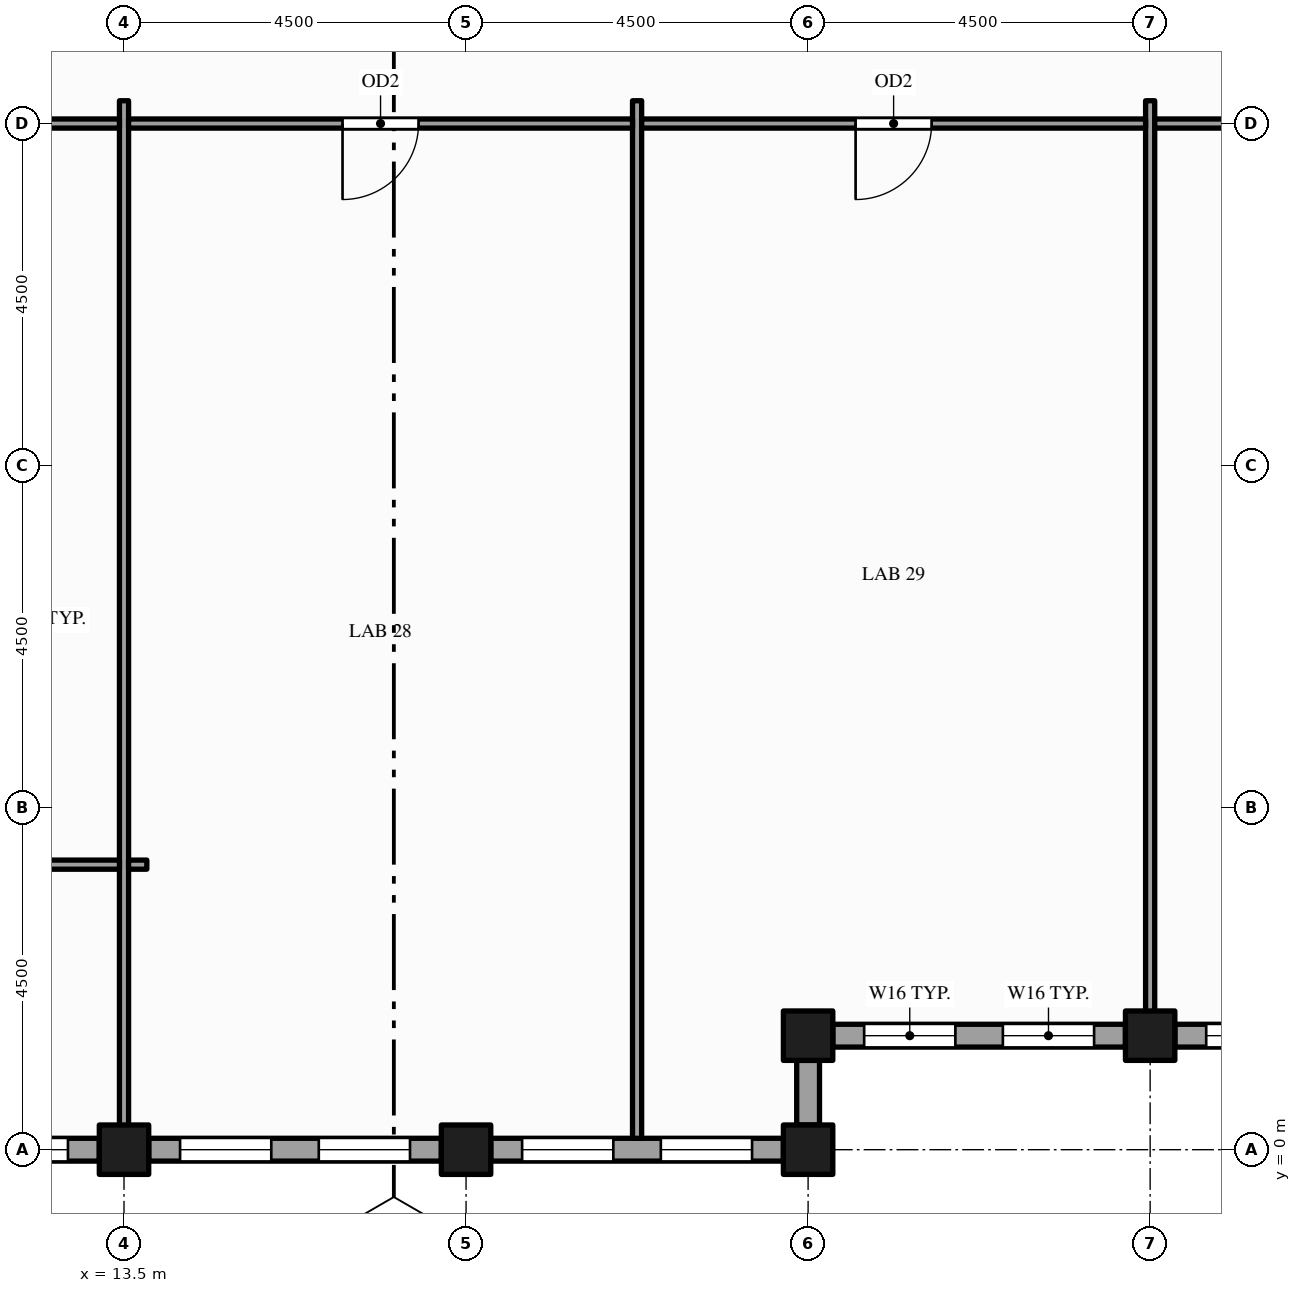
"""IFC4 building model, lengths in metres.
Left out: names, types, materials, properties, quantities, classifications, styles, units other than length and angle.
Written with IfcOpenShell. Run it as: python <this file> out.ifc"""

import sys

from ifc_helpers import new_model, si_unit, direction, frame, frame_2d, origin, origin_2d, place, context, subcontext, project, spatial, rectangle, hollow_rectangle, extrude, element, fill, save


model = new_model("IFC4")
c1 = context("Model", 3, precision=1e-05, world=origin(), true_north=direction((0.0, 1.0)))
c2 = subcontext(c1, "Body", "Model", "MODEL_VIEW")
j1 = project(units=[si_unit("LENGTHUNIT", "METRE"), si_unit("PLANEANGLEUNIT", "RADIAN")], contexts=[c1])
p1 = place(None, origin())
s1 = spatial("IfcSite", under=j1, at=p1, CompositionType="ELEMENT")
p2 = place(p1, origin())
s2 = spatial("IfcBuilding", under=s1, at=p2, CompositionType="ELEMENT")
p3 = place(p2, frame((0.0, 0.0, 285.0)))
s3 = spatial("IfcBuildingStorey", under=s2, at=p3, CompositionType="ELEMENT", Elevation=285.0)
for number, where, z_axis, x_axis in (
    (1, (13.5, 0.0, -0.15), (0.0, 0.0, 1.0), (1.0, 0.0, 0.0)),
    (2, (18.0, 0.0, -0.15), (0.0, 0.0, 1.0), (1.0, 0.0, 0.0)),
    (3, (22.5, 0.0, -0.15), (0.0, 0.0, 1.0), (1.0, 0.0, 0.0)),
    (4, (22.5, 1.5, -0.15), (0.0, 0.0, 1.0), (1.0, 0.0, 0.0)),
    (5, (27.0, 1.5, -0.15), (0.0, 0.0, 1.0), (1.0, 0.0, 0.0)),
):
    element("IfcColumn", number, at=place(p3, frame(where, z_axis=z_axis, x_axis=x_axis)), inside=s3, PredefinedType="COLUMN", context=c2, shape_type="SweptSolid", body=[
        extrude(hollow_rectangle(XDim=0.65, YDim=0.65, WallThickness=0.032, at=origin_2d()), origin(), (0.0, 0.0, 1.0), 4.0),
    ])
p4 = place(p3, frame((22.5, 0.325, 0.0), z_axis=(0.0, 0.0, 1.0), x_axis=(0.0, 1.0, 0.0)))
e6 = element("IfcWall", 6, at=p4, inside=s3, PredefinedType="STANDARD", context=c2, shape_type="SweptSolid", body=[
    extrude(rectangle(XDim=0.85, YDim=0.3, at=frame_2d((0.425, 0.0))), origin(), (0.0, 0.0, 1.0), 3.162),
])
p5 = place(p3, frame((22.825, 1.5, 0.0), z_axis=(0.0, 0.0, 1.0), x_axis=(1.0, 0.0, 0.0)))
e7 = element("IfcWall", 7, at=p5, inside=s3, PredefinedType="STANDARD", context=c2, shape_type="SweptSolid", body=[
    extrude(rectangle(XDim=3.85, YDim=0.3, at=frame_2d((1.925, 0.0))), origin(), (0.0, 0.0, 1.0), 2.87),
])
p6 = place(p5, frame((0.413, 0.0, 0.9)))
e8 = element("IfcOpeningElement", 8, at=p6, cuts=e7, PredefinedType="OPENING", context=c2, shape_type="SweptSolid", body=[
    extrude(rectangle(XDim=1.2, YDim=1.75, at=frame_2d((0.6, 0.875))), frame((0.0, 0.16, 0.0), z_axis=(0.0, -1.0, 0.0), x_axis=(1.0, 0.0, 0.0)), (0.0, 0.0, 1.0), 0.32),
])
p7 = place(p5, frame((2.238, 0.0, 0.9)))
e9 = element("IfcOpeningElement", 9, at=p7, cuts=e7, PredefinedType="OPENING", context=c2, shape_type="SweptSolid", body=[
    extrude(rectangle(XDim=1.2, YDim=1.75, at=frame_2d((0.6, 0.875))), frame((0.0, 0.16, 0.0), z_axis=(0.0, -1.0, 0.0), x_axis=(1.0, 0.0, 0.0)), (0.0, 0.0, 1.0), 0.32),
])
p8 = place(p3, frame((27.325, 1.5, 0.0), z_axis=(0.0, 0.0, 1.0), x_axis=(1.0, 0.0, 0.0)))
e10 = element("IfcWall", 10, at=p8, inside=s3, PredefinedType="STANDARD", context=c2, shape_type="SweptSolid", body=[
    extrude(rectangle(XDim=3.85, YDim=0.3, at=frame_2d((1.925, 0.0))), origin(), (0.0, 0.0, 1.0), 2.87),
])
p9 = place(p8, frame((0.413, 0.0, 0.9)))
e11 = element("IfcOpeningElement", 11, at=p9, cuts=e10, PredefinedType="OPENING", context=c2, shape_type="SweptSolid", body=[
    extrude(rectangle(XDim=1.2, YDim=1.75, at=frame_2d((0.6, 0.875))), frame((0.0, 0.16, 0.0), z_axis=(0.0, -1.0, 0.0), x_axis=(1.0, 0.0, 0.0)), (0.0, 0.0, 1.0), 0.32),
])
p10 = place(p8, frame((2.238, 0.0, 0.9)))
e12 = element("IfcOpeningElement", 12, at=p10, cuts=e10, PredefinedType="OPENING", context=c2, shape_type="SweptSolid", body=[
    extrude(rectangle(XDim=1.2, YDim=1.75, at=frame_2d((0.6, 0.875))), frame((0.0, 0.16, 0.0), z_axis=(0.0, -1.0, 0.0), x_axis=(1.0, 0.0, 0.0)), (0.0, 0.0, 1.0), 0.32),
])
p11 = place(p3, frame((9.325, 0.0, 0.0), z_axis=(0.0, 0.0, 1.0), x_axis=(1.0, 0.0, 0.0)))
e13 = element("IfcWall", 13, at=p11, inside=s3, PredefinedType="STANDARD", context=c2, shape_type="SweptSolid", body=[
    extrude(rectangle(XDim=3.85, YDim=0.3, at=frame_2d((1.925, 0.0))), origin(), (0.0, 0.0, 1.0), 2.87),
])
p12 = place(p11, frame((0.413, 0.0, 0.9)))
e14 = element("IfcOpeningElement", 14, at=p12, cuts=e13, PredefinedType="OPENING", context=c2, shape_type="SweptSolid", body=[
    extrude(rectangle(XDim=1.2, YDim=1.75, at=frame_2d((0.6, 0.875))), frame((0.0, 0.16, 0.0), z_axis=(0.0, -1.0, 0.0), x_axis=(1.0, 0.0, 0.0)), (0.0, 0.0, 1.0), 0.32),
])
p13 = place(p11, frame((2.238, 0.0, 0.9)))
e15 = element("IfcOpeningElement", 15, at=p13, cuts=e13, PredefinedType="OPENING", context=c2, shape_type="SweptSolid", body=[
    extrude(rectangle(XDim=1.2, YDim=1.75, at=frame_2d((0.6, 0.875))), frame((0.0, 0.16, 0.0), z_axis=(0.0, -1.0, 0.0), x_axis=(1.0, 0.0, 0.0)), (0.0, 0.0, 1.0), 0.32),
])
p14 = place(p3, frame((13.825, 0.0, 0.0), z_axis=(0.0, 0.0, 1.0), x_axis=(1.0, 0.0, 0.0)))
e16 = element("IfcWall", 16, at=p14, inside=s3, PredefinedType="STANDARD", context=c2, shape_type="SweptSolid", body=[
    extrude(rectangle(XDim=3.85, YDim=0.3, at=frame_2d((1.925, 0.0))), origin(), (0.0, 0.0, 1.0), 2.87),
])
p15 = place(p14, frame((0.413, 0.0, 0.9)))
e17 = element("IfcOpeningElement", 17, at=p15, cuts=e16, PredefinedType="OPENING", context=c2, shape_type="SweptSolid", body=[
    extrude(rectangle(XDim=1.2, YDim=1.75, at=frame_2d((0.6, 0.875))), frame((0.0, 0.16, 0.0), z_axis=(0.0, -1.0, 0.0), x_axis=(1.0, 0.0, 0.0)), (0.0, 0.0, 1.0), 0.32),
])
p16 = place(p14, frame((2.238, 0.0, 0.9)))
e18 = element("IfcOpeningElement", 18, at=p16, cuts=e16, PredefinedType="OPENING", context=c2, shape_type="SweptSolid", body=[
    extrude(rectangle(XDim=1.2, YDim=1.75, at=frame_2d((0.6, 0.875))), frame((0.0, 0.16, 0.0), z_axis=(0.0, -1.0, 0.0), x_axis=(1.0, 0.0, 0.0)), (0.0, 0.0, 1.0), 0.32),
])
p17 = place(p3, frame((18.325, 0.0, 0.0), z_axis=(0.0, 0.0, 1.0), x_axis=(1.0, 0.0, 0.0)))
e19 = element("IfcWall", 19, at=p17, inside=s3, PredefinedType="STANDARD", context=c2, shape_type="SweptSolid", body=[
    extrude(rectangle(XDim=3.85, YDim=0.3, at=frame_2d((1.925, 0.0))), origin(), (0.0, 0.0, 1.0), 2.87),
])
p18 = place(p17, frame((0.413, 0.0, 0.9)))
e20 = element("IfcOpeningElement", 20, at=p18, cuts=e19, PredefinedType="OPENING", context=c2, shape_type="SweptSolid", body=[
    extrude(rectangle(XDim=1.2, YDim=1.75, at=frame_2d((0.6, 0.875))), frame((0.0, 0.16, 0.0), z_axis=(0.0, -1.0, 0.0), x_axis=(1.0, 0.0, 0.0)), (0.0, 0.0, 1.0), 0.32),
])
p19 = place(p17, frame((2.238, 0.0, 0.9)))
e21 = element("IfcOpeningElement", 21, at=p19, cuts=e19, PredefinedType="OPENING", context=c2, shape_type="SweptSolid", body=[
    extrude(rectangle(XDim=1.2, YDim=1.75, at=frame_2d((0.6, 0.875))), frame((0.0, 0.16, 0.0), z_axis=(0.0, -1.0, 0.0), x_axis=(1.0, 0.0, 0.0)), (0.0, 0.0, 1.0), 0.32),
])
for number, where, z_axis, x_axis in (
    (22, (13.5, 0.15, 0.0), (0.0, 0.0, 1.0), (0.0, 1.0, 0.0)),
    (23, (20.25, 0.15, 0.0), (0.0, 0.0, 1.0), (0.0, 1.0, 0.0)),
):
    element("IfcWall", number, at=place(p3, frame(where, z_axis=z_axis, x_axis=x_axis)), inside=s3, PredefinedType="PARTITIONING", context=c2, shape_type="SweptSolid", body=[
        extrude(rectangle(XDim=13.65, YDim=0.12, at=frame_2d((6.825, 0.0))), origin(), (0.0, 0.0, 1.0), 2.87),
    ])
p20 = place(p3, frame((27.0, 1.65, 0.0), z_axis=(0.0, 0.0, 1.0), x_axis=(0.0, 1.0, 0.0)))
e24 = element("IfcWall", 24, at=p20, inside=s3, PredefinedType="PARTITIONING", context=c2, shape_type="SweptSolid", body=[
    extrude(rectangle(XDim=12.15, YDim=0.12, at=frame_2d((6.075, 0.0))), origin(), (0.0, 0.0, 1.0), 2.87),
])
p21 = place(p3, frame((9.125, 3.75, 0.0), z_axis=(0.0, 0.0, 1.0), x_axis=(1.0, 0.0, 0.0)))
e25 = element("IfcWall", 25, at=p21, inside=s3, PredefinedType="PARTITIONING", context=c2, shape_type="SweptSolid", body=[
    extrude(rectangle(XDim=4.315, YDim=0.12, at=frame_2d((2.157, 0.0))), origin(), (0.0, 0.0, 1.0), 2.87),
])
p22 = place(p3, frame((13.56, 3.75, 0.0), z_axis=(0.0, 0.0, 1.0), x_axis=(1.0, 0.0, 0.0)))
e26 = element("IfcWall", 26, at=p22, inside=s3, PredefinedType="PARTITIONING", context=c2, shape_type="SweptSolid", body=[
    extrude(rectangle(XDim=0.24, YDim=0.12, at=frame_2d((0.12, 0.0))), origin(), (0.0, 0.0, 1.0), 2.87),
])
p23 = place(p3, frame((0.15, 13.5, 0.0), z_axis=(0.0, 0.0, 1.0), x_axis=(1.0, 0.0, 0.0)))
e27 = element("IfcWall", 27, at=p23, inside=s3, PredefinedType="PARTITIONING", context=c2, shape_type="SweptSolid", body=[
    extrude(rectangle(XDim=13.29, YDim=0.12, at=frame_2d((6.645, 0.0))), origin(), (0.0, 0.0, 1.0), 2.87),
])
p24 = place(p23, frame((6.055, 0.0, 0.0)))
e28 = element("IfcOpeningElement", 28, at=p24, cuts=e27, PredefinedType="OPENING", context=c2, shape_type="SweptSolid", body=[
    extrude(rectangle(XDim=1.2, YDim=2.1, at=frame_2d((0.6, 1.05))), frame((0.0, 0.07, 0.0), z_axis=(0.0, -1.0, 0.0), x_axis=(1.0, 0.0, 0.0)), (0.0, 0.0, 1.0), 0.14),
])
p25 = place(p3, frame((13.56, 13.5, 0.0), z_axis=(0.0, 0.0, 1.0), x_axis=(1.0, 0.0, 0.0)))
e29 = element("IfcWall", 29, at=p25, inside=s3, PredefinedType="PARTITIONING", context=c2, shape_type="SweptSolid", body=[
    extrude(rectangle(XDim=6.63, YDim=0.12, at=frame_2d((3.315, 0.0))), origin(), (0.0, 0.0, 1.0), 2.87),
])
p26 = place(p25, frame((2.815, 0.0, 0.0)))
e30 = element("IfcOpeningElement", 30, at=p26, cuts=e29, PredefinedType="OPENING", context=c2, shape_type="SweptSolid", body=[
    extrude(rectangle(XDim=1.0, YDim=2.1, at=frame_2d((0.5, 1.05))), frame((0.0, 0.07, 0.0), z_axis=(0.0, -1.0, 0.0), x_axis=(1.0, 0.0, 0.0)), (0.0, 0.0, 1.0), 0.14),
])
p27 = place(p3, frame((20.31, 13.5, 0.0), z_axis=(0.0, 0.0, 1.0), x_axis=(1.0, 0.0, 0.0)))
e31 = element("IfcWall", 31, at=p27, inside=s3, PredefinedType="PARTITIONING", context=c2, shape_type="SweptSolid", body=[
    extrude(rectangle(XDim=6.63, YDim=0.12, at=frame_2d((3.315, 0.0))), origin(), (0.0, 0.0, 1.0), 2.87),
])
p28 = place(p27, frame((2.815, 0.0, 0.0)))
e32 = element("IfcOpeningElement", 32, at=p28, cuts=e31, PredefinedType="OPENING", context=c2, shape_type="SweptSolid", body=[
    extrude(rectangle(XDim=1.0, YDim=2.1, at=frame_2d((0.5, 1.05))), frame((0.0, 0.07, 0.0), z_axis=(0.0, -1.0, 0.0), x_axis=(1.0, 0.0, 0.0)), (0.0, 0.0, 1.0), 0.14),
])
p29 = place(p3, frame((27.06, 13.5, 0.0), z_axis=(0.0, 0.0, 1.0), x_axis=(1.0, 0.0, 0.0)))
e33 = element("IfcWall", 33, at=p29, inside=s3, PredefinedType="PARTITIONING", context=c2, shape_type="SweptSolid", body=[
    extrude(rectangle(XDim=4.38, YDim=0.12, at=frame_2d((2.19, 0.0))), origin(), (0.0, 0.0, 1.0), 2.87),
])
p30 = place(p29, frame((1.69, 0.0, 0.0)))
e34 = element("IfcOpeningElement", 34, at=p30, cuts=e33, PredefinedType="OPENING", context=c2, shape_type="SweptSolid", body=[
    extrude(rectangle(XDim=1.0, YDim=2.1, at=frame_2d((0.5, 1.05))), frame((0.0, 0.07, 0.0), z_axis=(0.0, -1.0, 0.0), x_axis=(1.0, 0.0, 0.0)), (0.0, 0.0, 1.0), 0.14),
])
p31 = place(p6, origin())
e35 = element("IfcWindow", 35, at=p31, inside=s3, PartitioningType="SINGLE_PANEL", PredefinedType="WINDOW", context=c2, shape_type="SweptSolid", body=[
    extrude(rectangle(XDim=1.2, YDim=1.75, at=frame_2d((0.6, 0.875))), frame((0.0, 0.03, 0.0), z_axis=(0.0, -1.0, 0.0), x_axis=(1.0, 0.0, 0.0)), (0.0, 0.0, 1.0), 0.06),
])
fill(e8, e35)
p32 = place(p7, origin())
e36 = element("IfcWindow", 36, at=p32, inside=s3, PartitioningType="SINGLE_PANEL", PredefinedType="WINDOW", context=c2, shape_type="SweptSolid", body=[
    extrude(rectangle(XDim=1.2, YDim=1.75, at=frame_2d((0.6, 0.875))), frame((0.0, 0.03, 0.0), z_axis=(0.0, -1.0, 0.0), x_axis=(1.0, 0.0, 0.0)), (0.0, 0.0, 1.0), 0.06),
])
fill(e9, e36)
p33 = place(p9, origin())
e37 = element("IfcWindow", 37, at=p33, inside=s3, PartitioningType="SINGLE_PANEL", PredefinedType="WINDOW", context=c2, shape_type="SweptSolid", body=[
    extrude(rectangle(XDim=1.2, YDim=1.75, at=frame_2d((0.6, 0.875))), frame((0.0, 0.03, 0.0), z_axis=(0.0, -1.0, 0.0), x_axis=(1.0, 0.0, 0.0)), (0.0, 0.0, 1.0), 0.06),
])
fill(e11, e37)
p34 = place(p13, origin())
e38 = element("IfcWindow", 38, at=p34, inside=s3, PartitioningType="SINGLE_PANEL", PredefinedType="WINDOW", context=c2, shape_type="SweptSolid", body=[
    extrude(rectangle(XDim=1.2, YDim=1.75, at=frame_2d((0.6, 0.875))), frame((0.0, 0.03, 0.0), z_axis=(0.0, -1.0, 0.0), x_axis=(1.0, 0.0, 0.0)), (0.0, 0.0, 1.0), 0.06),
])
fill(e15, e38)
p35 = place(p15, origin())
e39 = element("IfcWindow", 39, at=p35, inside=s3, PartitioningType="SINGLE_PANEL", PredefinedType="WINDOW", context=c2, shape_type="SweptSolid", body=[
    extrude(rectangle(XDim=1.2, YDim=1.75, at=frame_2d((0.6, 0.875))), frame((0.0, 0.03, 0.0), z_axis=(0.0, -1.0, 0.0), x_axis=(1.0, 0.0, 0.0)), (0.0, 0.0, 1.0), 0.06),
])
fill(e17, e39)
p36 = place(p16, origin())
e40 = element("IfcWindow", 40, at=p36, inside=s3, PartitioningType="SINGLE_PANEL", PredefinedType="WINDOW", context=c2, shape_type="SweptSolid", body=[
    extrude(rectangle(XDim=1.2, YDim=1.75, at=frame_2d((0.6, 0.875))), frame((0.0, 0.03, 0.0), z_axis=(0.0, -1.0, 0.0), x_axis=(1.0, 0.0, 0.0)), (0.0, 0.0, 1.0), 0.06),
])
fill(e18, e40)
p37 = place(p18, origin())
e41 = element("IfcWindow", 41, at=p37, inside=s3, PartitioningType="SINGLE_PANEL", PredefinedType="WINDOW", context=c2, shape_type="SweptSolid", body=[
    extrude(rectangle(XDim=1.2, YDim=1.75, at=frame_2d((0.6, 0.875))), frame((0.0, 0.03, 0.0), z_axis=(0.0, -1.0, 0.0), x_axis=(1.0, 0.0, 0.0)), (0.0, 0.0, 1.0), 0.06),
])
fill(e20, e41)
p38 = place(p19, origin())
e42 = element("IfcWindow", 42, at=p38, inside=s3, PartitioningType="SINGLE_PANEL", PredefinedType="WINDOW", context=c2, shape_type="SweptSolid", body=[
    extrude(rectangle(XDim=1.2, YDim=1.75, at=frame_2d((0.6, 0.875))), frame((0.0, 0.03, 0.0), z_axis=(0.0, -1.0, 0.0), x_axis=(1.0, 0.0, 0.0)), (0.0, 0.0, 1.0), 0.06),
])
fill(e21, e42)
p39 = place(p26, origin())
e43 = element("IfcDoor", 43, at=p39, inside=s3, OperationType="SINGLE_SWING_LEFT", PredefinedType="DOOR", context=c2, shape_type="SweptSolid", body=[
    extrude(rectangle(XDim=1.0, YDim=2.1, at=frame_2d((0.5, 1.05))), frame((0.0, 0.025, 0.0), z_axis=(0.0, -1.0, 0.0), x_axis=(1.0, 0.0, 0.0)), (0.0, 0.0, 1.0), 0.05),
])
fill(e30, e43)
p40 = place(p28, origin())
e44 = element("IfcDoor", 44, at=p40, inside=s3, OperationType="SINGLE_SWING_LEFT", PredefinedType="DOOR", context=c2, shape_type="SweptSolid", body=[
    extrude(rectangle(XDim=1.0, YDim=2.1, at=frame_2d((0.5, 1.05))), frame((0.0, 0.025, 0.0), z_axis=(0.0, -1.0, 0.0), x_axis=(1.0, 0.0, 0.0)), (0.0, 0.0, 1.0), 0.05),
])
fill(e32, e44)
save(model, sys.argv[1])
